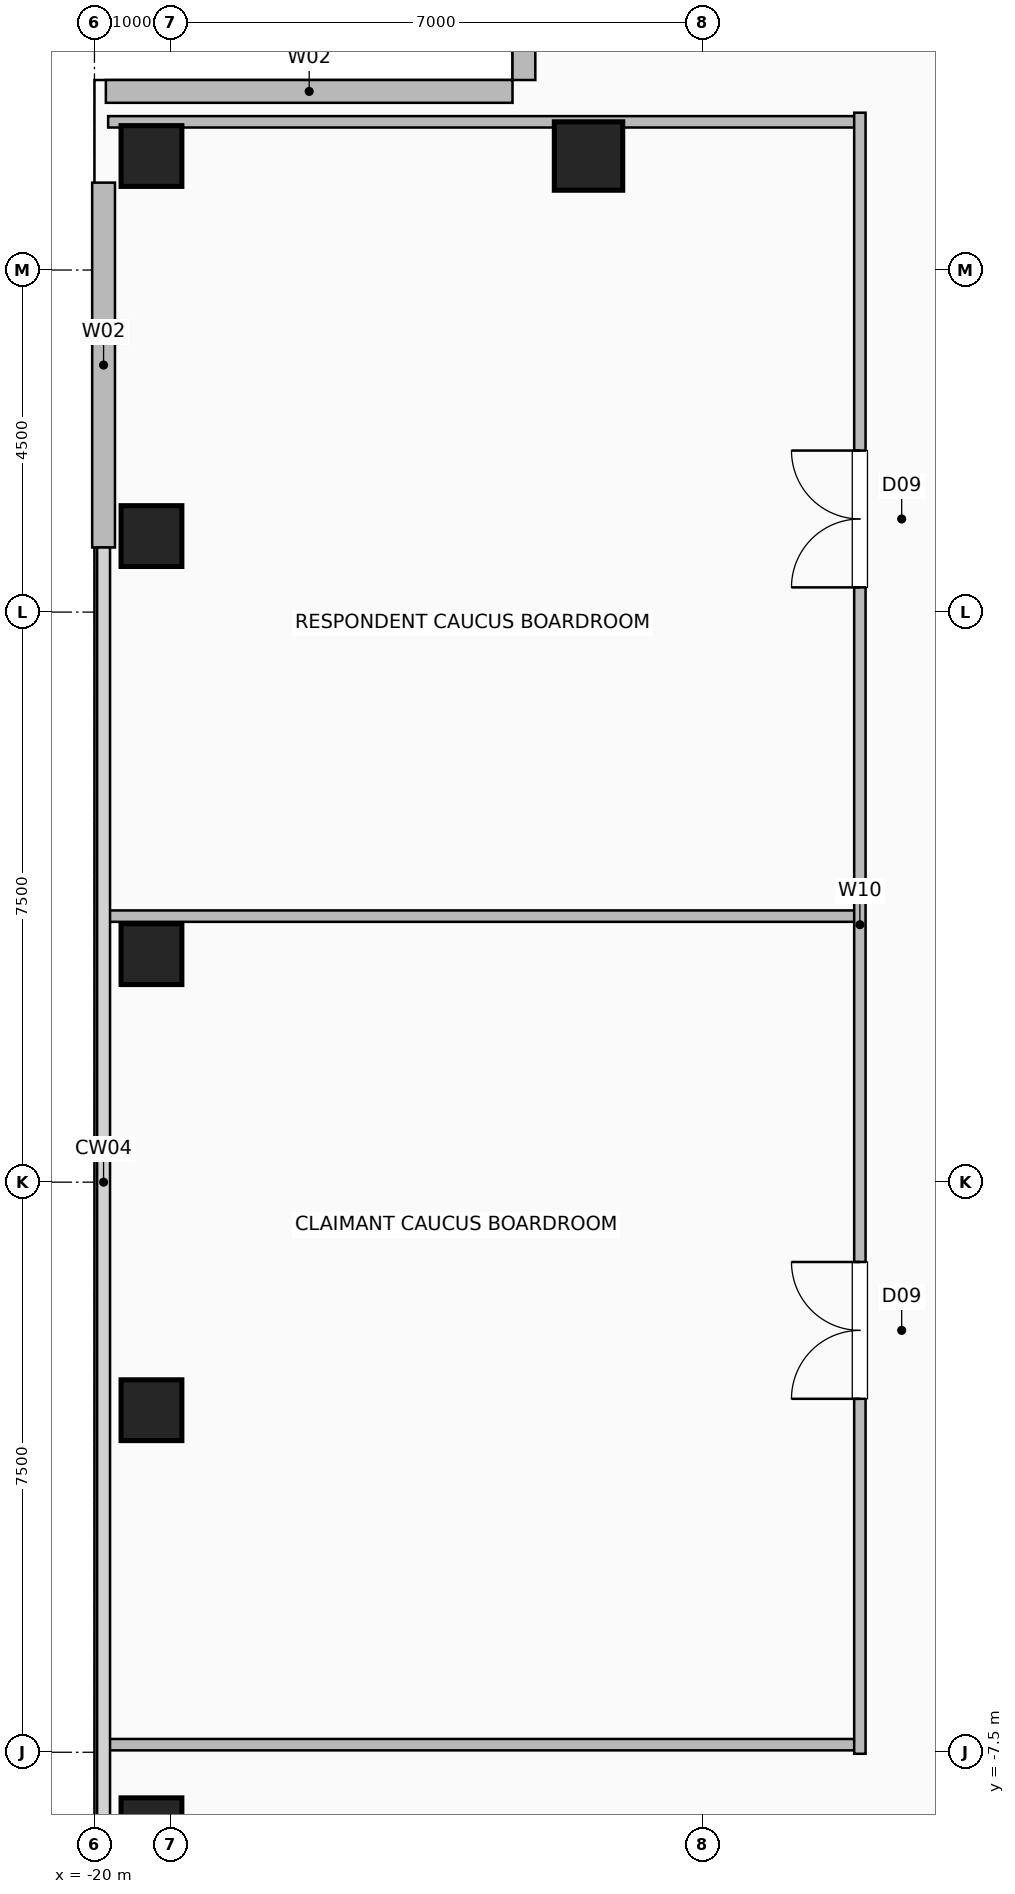
"""IFC4 building model, lengths in metres.
Left out: names, types, materials, properties, quantities, classifications, styles, units other than length and angle.
Written with IfcOpenShell. Run it as: python <this file> out.ifc"""

import sys

from ifc_helpers import new_model, si_unit, direction, frame, frame_2d, origin, origin_2d, place, context, subcontext, project, spatial, rectangle, hollow_rectangle, extrude, element, fill, save


model = new_model("IFC4")
c1 = context("Model", 3, precision=1e-05, world=origin(), true_north=direction((0.0, 1.0)))
c2 = subcontext(c1, "Body", "Model", "MODEL_VIEW")
j1 = project(units=[si_unit("LENGTHUNIT", "METRE"), si_unit("PLANEANGLEUNIT", "RADIAN")], contexts=[c1])
p1 = place(None, origin())
s1 = spatial("IfcSite", under=j1, at=p1, CompositionType="ELEMENT")
p2 = place(p1, origin())
s2 = spatial("IfcBuilding", under=s1, at=p2, CompositionType="ELEMENT")
p3 = place(p2, frame((0.0, 0.0, 180.6)))
s3 = spatial("IfcBuildingStorey", under=s2, at=p3, CompositionType="ELEMENT", Elevation=180.6)
for number, where, z_axis, x_axis in (
    (1, (-19.25, -8.5, 0.0), (0.0, 0.0, 1.0), (1.0, 0.0, 0.0)),
    (2, (-19.25, -3.0, 0.0), (0.0, 0.0, 1.0), (1.0, 0.0, 0.0)),
    (3, (-19.25, 3.0, 0.0), (0.0, 0.0, 1.0), (1.0, 0.0, 0.0)),
    (4, (-19.25, 8.5, 0.0), (0.0, 0.0, 1.0), (1.0, 0.0, 0.0)),
    (5, (-19.25, 13.5, 0.0), (0.0, 0.0, 1.0), (1.0, 0.0, 0.0)),
):
    element("IfcColumn", number, at=place(p3, frame(where, z_axis=z_axis, x_axis=x_axis)), inside=s3, PredefinedType="COLUMN", context=c2, shape_type="SweptSolid", body=[
        extrude(hollow_rectangle(XDim=0.8, YDim=0.8, WallThickness=0.04, at=origin_2d()), origin(), (0.0, 0.0, 1.0), 3.6),
    ])
p4 = place(p3, frame((-13.5, 13.5, 0.0), z_axis=(0.0, 0.0, 1.0), x_axis=(1.0, 0.0, 0.0)))
e6 = element("IfcColumn", 6, at=p4, inside=s3, PredefinedType="COLUMN", context=c2, shape_type="SweptSolid", body=[
    extrude(hollow_rectangle(XDim=0.9, YDim=0.9, WallThickness=0.045, at=origin_2d()), origin(), (0.0, 0.0, 1.0), 3.6),
])
p5 = place(p3, frame((-19.88, 8.35, 0.0), z_axis=(0.0, 0.0, 1.0), x_axis=(0.0, 1.0, 0.0)))
e7 = element("IfcWall", 7, at=p5, inside=s3, PredefinedType="SOLIDWALL", context=c2, shape_type="SweptSolid", body=[
    extrude(rectangle(XDim=4.8, YDim=0.3, at=frame_2d((2.4, 0.0))), origin(), (0.0, 0.0, 1.0), 3.36),
])
p6 = place(p3, frame((-14.35, 19.85, 0.0), z_axis=(0.0, 0.0, 1.0), x_axis=(0.0, -1.0, 0.0)))
e8 = element("IfcWall", 8, at=p6, inside=s3, PredefinedType="SOLIDWALL", context=c2, shape_type="SweptSolid", body=[
    extrude(rectangle(XDim=5.35, YDim=0.3, at=frame_2d((2.675, 0.0))), origin(), (0.0, 0.0, 1.0), 3.36),
])
p7 = place(p6, frame((1.925, 0.0, 0.9)))
e9 = element("IfcOpeningElement", 9, at=p7, cuts=e8, PredefinedType="OPENING", context=c2, shape_type="SweptSolid", body=[
    extrude(rectangle(XDim=1.5, YDim=1.8, at=frame_2d((0.75, 0.9))), frame((0.0, 0.16, 0.0), z_axis=(0.0, -1.0, 0.0), x_axis=(1.0, 0.0, 0.0)), (0.0, 0.0, 1.0), 0.32),
])
p8 = place(p3, frame((-19.85, 14.35, 0.0), z_axis=(0.0, 0.0, 1.0), x_axis=(1.0, 0.0, 0.0)))
e10 = element("IfcWall", 10, at=p8, inside=s3, PredefinedType="SOLIDWALL", context=c2, shape_type="SweptSolid", body=[
    extrude(rectangle(XDim=5.35, YDim=0.3, at=frame_2d((2.675, 0.0))), origin(), (0.0, 0.0, 1.0), 3.36),
])
for number, where, z_axis, x_axis in (
    (11, (-19.82, -7.4, 0.0), (0.0, 0.0, 1.0), (1.0, 0.0, 0.0)),
    (12, (-19.82, 3.5, 0.0), (0.0, 0.0, 1.0), (1.0, 0.0, 0.0)),
    (13, (-19.82, 13.95, 0.0), (0.0, 0.0, 1.0), (1.0, 0.0, 0.0)),
):
    element("IfcWall", number, at=place(p3, frame(where, z_axis=z_axis, x_axis=x_axis)), inside=s3, PredefinedType="PARTITIONING", context=c2, shape_type="SweptSolid", body=[
        extrude(rectangle(XDim=9.89, YDim=0.15, at=frame_2d((4.945, 0.0))), origin(), (0.0, 0.0, 1.0), 3.36),
    ])
p9 = place(p3, frame((-9.93, -7.52, 0.0), z_axis=(0.0, 0.0, 1.0), x_axis=(0.0, 1.0, 0.0)))
e14 = element("IfcWall", 14, at=p9, inside=s3, PredefinedType="PARTITIONING", context=c2, shape_type="SweptSolid", body=[
    extrude(rectangle(XDim=21.59, YDim=0.15, at=frame_2d((10.795, 0.0))), origin(), (0.0, 0.0, 1.0), 3.36),
])
p10 = place(p9, frame((4.67, 0.0, 0.0)))
e15 = element("IfcOpeningElement", 15, at=p10, cuts=e14, PredefinedType="OPENING", context=c2, shape_type="SweptSolid", body=[
    extrude(rectangle(XDim=1.8, YDim=2.08, at=frame_2d((0.9, 1.04))), frame((0.0, 0.085, 0.0), z_axis=(0.0, -1.0, 0.0), x_axis=(1.0, 0.0, 0.0)), (0.0, 0.0, 1.0), 0.17),
])
p11 = place(p9, frame((15.345, 0.0, 0.0)))
e16 = element("IfcOpeningElement", 16, at=p11, cuts=e14, PredefinedType="OPENING", context=c2, shape_type="SweptSolid", body=[
    extrude(rectangle(XDim=1.8, YDim=2.08, at=frame_2d((0.9, 1.04))), frame((0.0, 0.085, 0.0), z_axis=(0.0, -1.0, 0.0), x_axis=(1.0, 0.0, 0.0)), (0.0, 0.0, 1.0), 0.17),
])
p12 = place(p10, origin())
e17 = element("IfcDoor", 17, at=p12, inside=s3, OperationType="DOUBLE_DOOR_SINGLE_SWING", PredefinedType="DOOR", context=c2, shape_type="SweptSolid", body=[
    extrude(rectangle(XDim=1.8, YDim=2.08, at=frame_2d((0.9, 1.04))), frame((0.0, 0.025, 0.0), z_axis=(0.0, -1.0, 0.0), x_axis=(1.0, 0.0, 0.0)), (0.0, 0.0, 1.0), 0.05),
])
fill(e15, e17)
p13 = place(p11, origin())
e18 = element("IfcDoor", 18, at=p13, inside=s3, OperationType="DOUBLE_DOOR_SINGLE_SWING", PredefinedType="DOOR", context=c2, shape_type="SweptSolid", body=[
    extrude(rectangle(XDim=1.8, YDim=2.08, at=frame_2d((0.9, 1.04))), frame((0.0, 0.025, 0.0), z_axis=(0.0, -1.0, 0.0), x_axis=(1.0, 0.0, 0.0)), (0.0, 0.0, 1.0), 0.05),
])
fill(e16, e18)
save(model, sys.argv[1])
